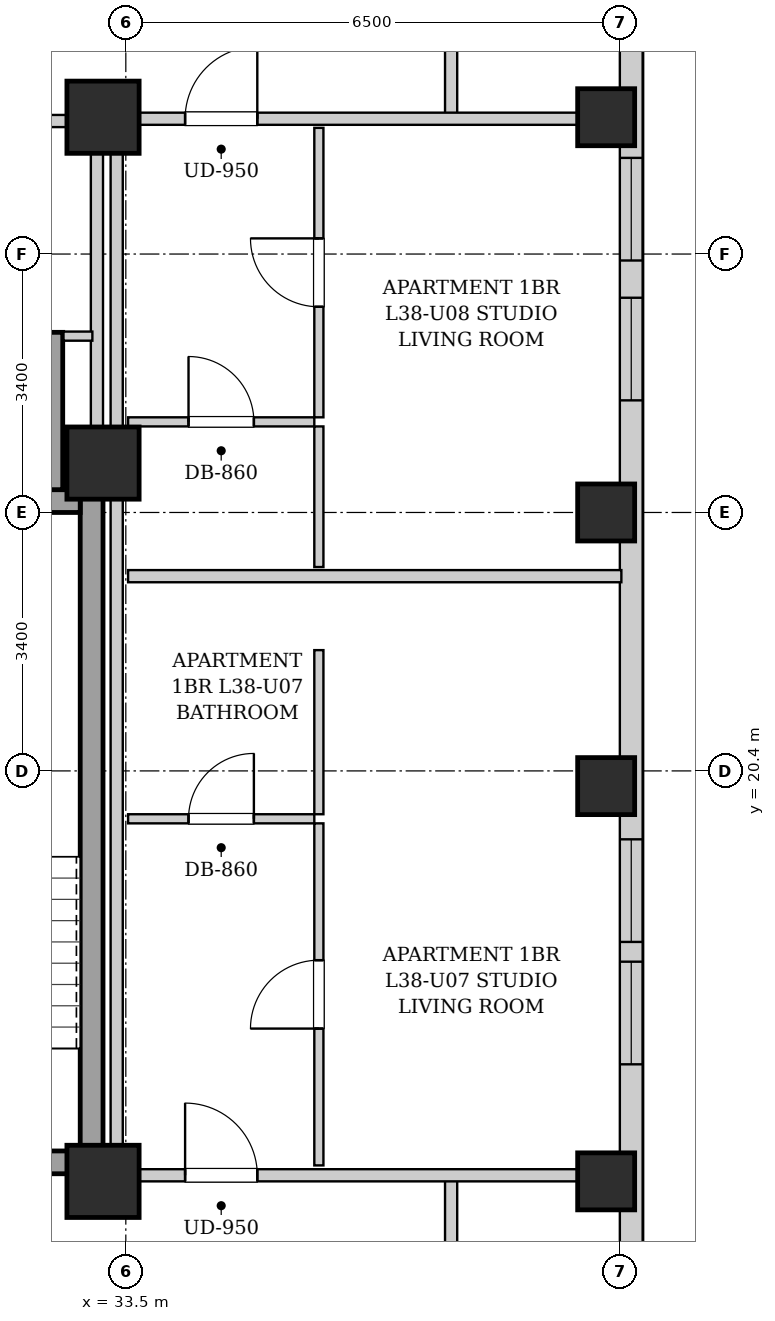
"""IFC4 building model, lengths in metres.
Left out: names, types, materials, properties, quantities, classifications, styles, units other than length and angle.
Written with IfcOpenShell. Run it as: python <this file> out.ifc"""

import sys

from ifc_helpers import new_model, si_unit, direction, frame, frame_2d, origin, origin_2d, place, context, subcontext, project, spatial, rectangle, extrude, element, fill, save


model = new_model("IFC4")
c1 = context("Model", 3, precision=1e-05, world=origin(), true_north=direction((0.0, 1.0)))
c2 = subcontext(c1, "Body", "Model", "MODEL_VIEW")
j1 = project(units=[si_unit("LENGTHUNIT", "METRE"), si_unit("PLANEANGLEUNIT", "RADIAN")], contexts=[c1])
p1 = place(None, origin())
s1 = spatial("IfcSite", under=j1, at=p1, CompositionType="ELEMENT")
p2 = place(p1, origin())
s2 = spatial("IfcBuilding", under=s1, at=p2, CompositionType="ELEMENT")
p3 = place(p2, frame((0.0, 0.0, 134.15)))
s3 = spatial("IfcBuildingStorey", under=s2, at=p3, CompositionType="ELEMENT", Elevation=134.15)
for number, where, z_axis, x_axis in (
    (1, (39.82, 15.0, 0.0), (0.0, 0.0, 1.0), (1.0, 0.0, 0.0)),
    (2, (39.82, 20.2, 0.0), (0.0, 0.0, 1.0), (1.0, 0.0, 0.0)),
    (3, (39.82, 23.8, 0.0), (0.0, 0.0, 1.0), (1.0, 0.0, 0.0)),
    (4, (39.82, 29.0, 0.0), (0.0, 0.0, 1.0), (1.0, 0.0, 0.0)),
):
    element("IfcColumn", number, at=place(p3, frame(where, z_axis=z_axis, x_axis=x_axis)), inside=s3, PredefinedType="COLUMN", context=c2, shape_type="SweptSolid", body=[
        extrude(rectangle(XDim=0.75, YDim=0.75, at=origin_2d()), origin(), (0.0, 0.0, 1.0), 3.25),
    ])
for number, where, z_axis, x_axis in (
    (5, (33.2, 15.0, 0.0), (0.0, 0.0, 1.0), (1.0, 0.0, 0.0)),
    (6, (33.2, 29.0, 0.0), (0.0, 0.0, 1.0), (1.0, 0.0, 0.0)),
    (7, (33.2, 24.45, 0.0), (0.0, 0.0, 1.0), (1.0, 0.0, 0.0)),
):
    element("IfcColumn", number, at=place(p3, frame(where, z_axis=z_axis, x_axis=x_axis)), inside=s3, PredefinedType="COLUMN", context=c2, shape_type="SweptSolid", body=[
        extrude(rectangle(XDim=0.95, YDim=0.95, at=origin_2d()), origin(), (0.0, 0.0, 1.0), 3.25),
    ])
p4 = place(p3, frame((40.15, 40.8, 0.0), z_axis=(0.0, 0.0, 1.0), x_axis=(0.0, -1.0, 0.0)))
e8 = element("IfcWall", 8, at=p4, inside=s3, PredefinedType="SOLIDWALL", context=c2, shape_type="SweptSolid", body=[
    extrude(rectangle(XDim=34.5, YDim=0.3, at=frame_2d((17.25, 0.0))), origin(), (0.0, 0.0, 1.0), 2.99),
])
p5 = place(p4, frame((31.725, 0.0, 0.55)))
e9 = element("IfcOpeningElement", 9, at=p5, cuts=e8, PredefinedType="OPENING", context=c2, shape_type="SweptSolid", body=[
    extrude(rectangle(XDim=1.35, YDim=1.2, at=frame_2d((0.675, 0.6))), frame((0.0, 0.16, 0.0), z_axis=(0.0, -1.0, 0.0), x_axis=(1.0, 0.0, 0.0)), (0.0, 0.0, 1.0), 0.32),
])
p6 = place(p4, frame((3.0, 0.0, 0.55)))
e10 = element("IfcOpeningElement", 10, at=p6, cuts=e8, PredefinedType="OPENING", context=c2, shape_type="SweptSolid", body=[
    extrude(rectangle(XDim=1.35, YDim=1.2, at=frame_2d((0.675, 0.6))), frame((0.0, 0.16, 0.0), z_axis=(0.0, -1.0, 0.0), x_axis=(1.0, 0.0, 0.0)), (0.0, 0.0, 1.0), 0.32),
])
p7 = place(p4, frame((1.085, 0.0, 0.55)))
e11 = element("IfcOpeningElement", 11, at=p7, cuts=e8, PredefinedType="OPENING", context=c2, shape_type="SweptSolid", body=[
    extrude(rectangle(XDim=1.35, YDim=1.2, at=frame_2d((0.675, 0.6))), frame((0.0, 0.16, 0.0), z_axis=(0.0, -1.0, 0.0), x_axis=(1.0, 0.0, 0.0)), (0.0, 0.0, 1.0), 0.32),
])
p8 = place(p4, frame((21.3, 0.0, 0.55)))
e12 = element("IfcOpeningElement", 12, at=p8, cuts=e8, PredefinedType="OPENING", context=c2, shape_type="SweptSolid", body=[
    extrude(rectangle(XDim=1.35, YDim=1.2, at=frame_2d((0.675, 0.6))), frame((0.0, 0.16, 0.0), z_axis=(0.0, -1.0, 0.0), x_axis=(1.0, 0.0, 0.0)), (0.0, 0.0, 1.0), 0.32),
])
p9 = place(p4, frame((22.91, 0.0, 0.55)))
e13 = element("IfcOpeningElement", 13, at=p9, cuts=e8, PredefinedType="OPENING", context=c2, shape_type="SweptSolid", body=[
    extrude(rectangle(XDim=1.35, YDim=1.2, at=frame_2d((0.675, 0.6))), frame((0.0, 0.16, 0.0), z_axis=(0.0, -1.0, 0.0), x_axis=(1.0, 0.0, 0.0)), (0.0, 0.0, 1.0), 0.32),
])
p10 = place(p4, frame((14.175, 0.0, 0.55)))
e14 = element("IfcOpeningElement", 14, at=p10, cuts=e8, PredefinedType="OPENING", context=c2, shape_type="SweptSolid", body=[
    extrude(rectangle(XDim=1.35, YDim=1.2, at=frame_2d((0.675, 0.6))), frame((0.0, 0.16, 0.0), z_axis=(0.0, -1.0, 0.0), x_axis=(1.0, 0.0, 0.0)), (0.0, 0.0, 1.0), 0.32),
])
p11 = place(p4, frame((12.335, 0.0, 0.55)))
e15 = element("IfcOpeningElement", 15, at=p11, cuts=e8, PredefinedType="OPENING", context=c2, shape_type="SweptSolid", body=[
    extrude(rectangle(XDim=1.35, YDim=1.2, at=frame_2d((0.675, 0.6))), frame((0.0, 0.16, 0.0), z_axis=(0.0, -1.0, 0.0), x_axis=(1.0, 0.0, 0.0)), (0.0, 0.0, 1.0), 0.32),
])
p12 = place(p3, frame((33.05, 15.1, 0.0), z_axis=(0.0, 0.0, 1.0), x_axis=(0.0, 1.0, 0.0)))
e16 = element("IfcWall", 16, at=p12, inside=s3, PredefinedType="SHEAR", context=c2, shape_type="SweptSolid", body=[
    extrude(rectangle(XDim=9.0, YDim=0.3, at=frame_2d((4.5, 0.0))), origin(), (0.0, 0.0, 1.0), 2.99),
])
p13 = place(p3, frame((30.05, 23.95, 0.0), z_axis=(0.0, 0.0, 1.0), x_axis=(1.0, 0.0, 0.0)))
e17 = element("IfcWall", 17, at=p13, inside=s3, PredefinedType="SHEAR", context=c2, shape_type="SweptSolid", body=[
    extrude(rectangle(XDim=2.85, YDim=0.3, at=frame_2d((1.425, 0.0))), origin(), (0.0, 0.0, 1.0), 2.99),
])
p14 = place(p3, frame((30.05, 15.25, 0.0), z_axis=(0.0, 0.0, 1.0), x_axis=(1.0, 0.0, 0.0)))
e18 = element("IfcWall", 18, at=p14, inside=s3, PredefinedType="SHEAR", context=c2, shape_type="SweptSolid", body=[
    extrude(rectangle(XDim=2.85, YDim=0.3, at=frame_2d((1.425, 0.0))), origin(), (0.0, 0.0, 1.0), 2.99),
])
p15 = place(p14, frame((0.86, 0.0, 0.0)))
e19 = element("IfcOpeningElement", 19, at=p15, cuts=e18, PredefinedType="OPENING", context=c2, shape_type="SweptSolid", body=[
    extrude(rectangle(XDim=1.1, YDim=2.05, at=frame_2d((0.55, 1.025))), frame((0.0, 0.16, 0.0), z_axis=(0.0, -1.0, 0.0), x_axis=(1.0, 0.0, 0.0)), (0.0, 0.0, 1.0), 0.32),
])
p16 = place(p3, frame((32.56, 24.1, 0.0), z_axis=(0.0, 0.0, 1.0), x_axis=(0.0, 1.0, 0.0)))
e20 = element("IfcWall", 20, at=p16, inside=s3, PredefinedType="SHEAR", context=c2, shape_type="SweptSolid", body=[
    extrude(rectangle(XDim=2.07, YDim=0.22, at=frame_2d((1.035, 0.0))), origin(), (0.0, 0.0, 1.0), 2.99),
])
p17 = place(p3, frame((33.12, 24.12, 0.0), z_axis=(0.0, 0.0, 1.0), x_axis=(0.0, 1.0, 0.0)))
e21 = element("IfcWall", 21, at=p17, inside=s3, PredefinedType="PARTITIONING", context=c2, shape_type="SweptSolid", body=[
    extrude(rectangle(XDim=4.76, YDim=0.16, at=frame_2d((2.38, 0.0))), origin(), (0.0, 0.0, 1.0), 2.99),
])
p18 = place(p3, frame((32.68, 26.12, 0.0), z_axis=(0.0, 0.0, 1.0), x_axis=(1.0, 0.0, 0.0)))
e22 = element("IfcWall", 22, at=p18, inside=s3, PredefinedType="PARTITIONING", context=c2, shape_type="SweptSolid", body=[
    extrude(rectangle(XDim=0.38, YDim=0.12, at=frame_2d((0.19, 0.0))), origin(), (0.0, 0.0, 1.0), 2.99),
])
p19 = place(p3, frame((30.08, 28.95, 0.0), z_axis=(0.0, 0.0, 1.0), x_axis=(1.0, 0.0, 0.0)))
e23 = element("IfcWall", 23, at=p19, inside=s3, PredefinedType="PARTITIONING", context=c2, shape_type="SweptSolid", body=[
    extrude(rectangle(XDim=2.96, YDim=0.16, at=frame_2d((1.48, 0.0))), origin(), (0.0, 0.0, 1.0), 2.99),
])
p20 = place(p19, frame((0.695, 0.0, 0.0)))
e24 = element("IfcOpeningElement", 24, at=p20, cuts=e23, PredefinedType="OPENING", context=c2, shape_type="SweptSolid", body=[
    extrude(rectangle(XDim=0.86, YDim=2.05, at=frame_2d((0.43, 1.025))), frame((0.0, 0.09, 0.0), z_axis=(0.0, -1.0, 0.0), x_axis=(1.0, 0.0, 0.0)), (0.0, 0.0, 1.0), 0.18),
])
for number, where, z_axis, x_axis in (
    (25, (37.78, 13.35, 0.0), (0.0, 0.0, 1.0), (0.0, 1.0, 0.0)),
    (26, (37.78, 28.98, 0.0), (0.0, 0.0, 1.0), (0.0, 1.0, 0.0)),
):
    element("IfcWall", number, at=place(p3, frame(where, z_axis=z_axis, x_axis=x_axis)), inside=s3, PredefinedType="PARTITIONING", context=c2, shape_type="SweptSolid", body=[
        extrude(rectangle(XDim=1.74, YDim=0.16, at=frame_2d((0.87, 0.0))), origin(), (0.0, 0.0, 1.0), 2.99),
    ])
p21 = place(p3, frame((33.38, 15.08, 0.0), z_axis=(0.0, 0.0, 1.0), x_axis=(1.0, 0.0, 0.0)))
e27 = element("IfcWall", 27, at=p21, inside=s3, PredefinedType="PARTITIONING", context=c2, shape_type="SweptSolid", body=[
    extrude(rectangle(XDim=6.64, YDim=0.16, at=frame_2d((3.32, 0.0))), origin(), (0.0, 0.0, 1.0), 2.426),
])
p22 = place(p21, frame((0.9, 0.0, 0.0)))
e28 = element("IfcOpeningElement", 28, at=p22, cuts=e27, PredefinedType="OPENING", context=c2, shape_type="SweptSolid", body=[
    extrude(rectangle(XDim=0.95, YDim=2.1, at=frame_2d((0.475, 1.05))), frame((0.0, 0.09, 0.0), z_axis=(0.0, -1.0, 0.0), x_axis=(1.0, 0.0, 0.0)), (0.0, 0.0, 1.0), 0.18),
])
p23 = place(p3, frame((33.53, 22.962, 0.0), z_axis=(0.0, 0.0, 1.0), x_axis=(1.0, 0.0, 0.0)))
e29 = element("IfcWall", 29, at=p23, inside=s3, PredefinedType="PARTITIONING", context=c2, shape_type="SweptSolid", body=[
    extrude(rectangle(XDim=6.49, YDim=0.16, at=frame_2d((3.245, 0.0))), origin(), (0.0, 0.0, 1.0), 2.99),
])
p24 = place(p3, frame((33.53, 19.77, 0.0), z_axis=(0.0, 0.0, 1.0), x_axis=(1.0, 0.0, 0.0)))
e30 = element("IfcWall", 30, at=p24, inside=s3, PredefinedType="PARTITIONING", context=c2, shape_type="SweptSolid", body=[
    extrude(rectangle(XDim=2.45, YDim=0.12, at=frame_2d((1.225, 0.0))), origin(), (0.0, 0.0, 1.0), 2.99),
])
p25 = place(p24, frame((0.795, 0.0, 0.0)))
e31 = element("IfcOpeningElement", 31, at=p25, cuts=e30, PredefinedType="OPENING", context=c2, shape_type="SweptSolid", body=[
    extrude(rectangle(XDim=0.86, YDim=2.05, at=frame_2d((0.43, 1.025))), frame((0.0, 0.07, 0.0), z_axis=(0.0, -1.0, 0.0), x_axis=(1.0, 0.0, 0.0)), (0.0, 0.0, 1.0), 0.14),
])
p26 = place(p3, frame((36.04, 19.83, 0.0), z_axis=(0.0, 0.0, 1.0), x_axis=(0.0, 1.0, 0.0)))
e32 = element("IfcWall", 32, at=p26, inside=s3, PredefinedType="PARTITIONING", context=c2, shape_type="SweptSolid", body=[
    extrude(rectangle(XDim=2.159, YDim=0.12, at=frame_2d((1.08, 0.0))), origin(), (0.0, 0.0, 1.0), 2.99),
])
p27 = place(p3, frame((36.04, 15.21, 0.0), z_axis=(0.0, 0.0, 1.0), x_axis=(0.0, 1.0, 0.0)))
e33 = element("IfcWall", 33, at=p27, inside=s3, PredefinedType="PARTITIONING", context=c2, shape_type="SweptSolid", body=[
    extrude(rectangle(XDim=4.5, YDim=0.12, at=frame_2d((2.25, 0.0))), origin(), (0.0, 0.0, 1.0), 2.99),
])
p28 = place(p27, frame((1.8, 0.0, 0.0)))
e34 = element("IfcOpeningElement", 34, at=p28, cuts=e33, PredefinedType="OPENING", context=c2, shape_type="SweptSolid", body=[
    extrude(rectangle(XDim=0.9, YDim=2.05, at=frame_2d((0.45, 1.025))), frame((0.0, 0.07, 0.0), z_axis=(0.0, -1.0, 0.0), x_axis=(1.0, 0.0, 0.0)), (0.0, 0.0, 1.0), 0.14),
])
p29 = place(p3, frame((33.38, 28.98, 0.0), z_axis=(0.0, 0.0, 1.0), x_axis=(1.0, 0.0, 0.0)))
e35 = element("IfcWall", 35, at=p29, inside=s3, PredefinedType="PARTITIONING", context=c2, shape_type="SweptSolid", body=[
    extrude(rectangle(XDim=6.64, YDim=0.16, at=frame_2d((3.32, 0.0))), origin(), (0.0, 0.0, 1.0), 2.426),
])
p30 = place(p29, frame((0.9, 0.0, 0.0)))
e36 = element("IfcOpeningElement", 36, at=p30, cuts=e35, PredefinedType="OPENING", context=c2, shape_type="SweptSolid", body=[
    extrude(rectangle(XDim=0.95, YDim=2.1, at=frame_2d((0.475, 1.05))), frame((0.0, 0.09, 0.0), z_axis=(0.0, -1.0, 0.0), x_axis=(1.0, 0.0, 0.0)), (0.0, 0.0, 1.0), 0.18),
])
p31 = place(p3, frame((33.53, 24.992, 0.0), z_axis=(0.0, 0.0, 1.0), x_axis=(1.0, 0.0, 0.0)))
e37 = element("IfcWall", 37, at=p31, inside=s3, PredefinedType="PARTITIONING", context=c2, shape_type="SweptSolid", body=[
    extrude(rectangle(XDim=2.45, YDim=0.12, at=frame_2d((1.225, 0.0))), origin(), (0.0, 0.0, 1.0), 2.99),
])
p32 = place(p31, frame((0.795, 0.0, 0.0)))
e38 = element("IfcOpeningElement", 38, at=p32, cuts=e37, PredefinedType="OPENING", context=c2, shape_type="SweptSolid", body=[
    extrude(rectangle(XDim=0.86, YDim=2.05, at=frame_2d((0.43, 1.025))), frame((0.0, 0.07, 0.0), z_axis=(0.0, -1.0, 0.0), x_axis=(1.0, 0.0, 0.0)), (0.0, 0.0, 1.0), 0.14),
])
p33 = place(p3, frame((36.04, 23.082, 0.0), z_axis=(0.0, 0.0, 1.0), x_axis=(0.0, 1.0, 0.0)))
e39 = element("IfcWall", 39, at=p33, inside=s3, PredefinedType="PARTITIONING", context=c2, shape_type="SweptSolid", body=[
    extrude(rectangle(XDim=1.85, YDim=0.12, at=frame_2d((0.925, 0.0))), origin(), (0.0, 0.0, 1.0), 2.99),
])
p34 = place(p3, frame((36.04, 25.052, 0.0), z_axis=(0.0, 0.0, 1.0), x_axis=(0.0, 1.0, 0.0)))
e40 = element("IfcWall", 40, at=p34, inside=s3, PredefinedType="PARTITIONING", context=c2, shape_type="SweptSolid", body=[
    extrude(rectangle(XDim=3.808, YDim=0.12, at=frame_2d((1.904, 0.0))), origin(), (0.0, 0.0, 1.0), 2.99),
])
p35 = place(p34, frame((1.454, 0.0, 0.0)))
e41 = element("IfcOpeningElement", 41, at=p35, cuts=e40, PredefinedType="OPENING", context=c2, shape_type="SweptSolid", body=[
    extrude(rectangle(XDim=0.9, YDim=2.05, at=frame_2d((0.45, 1.025))), frame((0.0, 0.07, 0.0), z_axis=(0.0, -1.0, 0.0), x_axis=(1.0, 0.0, 0.0)), (0.0, 0.0, 1.0), 0.14),
])
p36 = place(p3, frame((33.38, 15.02, 0.0), z_axis=(0.0, 0.0, 1.0), x_axis=(0.0, 1.0, 0.0)))
e42 = element("IfcWall", 42, at=p36, inside=s3, PredefinedType="PARTITIONING", context=c2, shape_type="SweptSolid", body=[
    extrude(rectangle(XDim=13.98, YDim=0.16, at=frame_2d((6.99, 0.0))), origin(), (0.0, 0.0, 1.0), 2.99),
])
p37 = place(p22, origin())
e43 = element("IfcDoor", 43, at=p37, inside=s3, OperationType="SINGLE_SWING_LEFT", PredefinedType="DOOR", context=c2, shape_type="SweptSolid", body=[
    extrude(rectangle(XDim=0.95, YDim=2.1, at=frame_2d((0.475, 1.05))), frame((0.0, 0.025, 0.0), z_axis=(0.0, -1.0, 0.0), x_axis=(1.0, 0.0, 0.0)), (0.0, 0.0, 1.0), 0.05),
])
fill(e28, e43)
p38 = place(p25, origin())
e44 = element("IfcDoor", 44, at=p38, inside=s3, OperationType="SINGLE_SWING_RIGHT", PredefinedType="DOOR", context=c2, shape_type="SweptSolid", body=[
    extrude(rectangle(XDim=0.86, YDim=2.05, at=frame_2d((0.43, 1.025))), frame((0.0, 0.025, 0.0), z_axis=(0.0, -1.0, 0.0), x_axis=(1.0, 0.0, 0.0)), (0.0, 0.0, 1.0), 0.05),
])
fill(e31, e44)
p39 = place(p28, origin())
e45 = element("IfcDoor", 45, at=p39, inside=s3, OperationType="SINGLE_SWING_LEFT", PredefinedType="DOOR", context=c2, shape_type="SweptSolid", body=[
    extrude(rectangle(XDim=0.9, YDim=2.05, at=frame_2d((0.45, 1.025))), frame((0.0, 0.025, 0.0), z_axis=(0.0, -1.0, 0.0), x_axis=(1.0, 0.0, 0.0)), (0.0, 0.0, 1.0), 0.05),
])
fill(e34, e45)
p40 = place(p30, origin())
e46 = element("IfcDoor", 46, at=p40, inside=s3, OperationType="SINGLE_SWING_RIGHT", PredefinedType="DOOR", context=c2, shape_type="SweptSolid", body=[
    extrude(rectangle(XDim=0.95, YDim=2.1, at=frame_2d((0.475, 1.05))), frame((0.0, 0.025, 0.0), z_axis=(0.0, -1.0, 0.0), x_axis=(1.0, 0.0, 0.0)), (0.0, 0.0, 1.0), 0.05),
])
fill(e36, e46)
p41 = place(p32, origin())
e47 = element("IfcDoor", 47, at=p41, inside=s3, OperationType="SINGLE_SWING_LEFT", PredefinedType="DOOR", context=c2, shape_type="SweptSolid", body=[
    extrude(rectangle(XDim=0.86, YDim=2.05, at=frame_2d((0.43, 1.025))), frame((0.0, 0.025, 0.0), z_axis=(0.0, -1.0, 0.0), x_axis=(1.0, 0.0, 0.0)), (0.0, 0.0, 1.0), 0.05),
])
fill(e38, e47)
p42 = place(p35, origin())
e48 = element("IfcDoor", 48, at=p42, inside=s3, OperationType="SINGLE_SWING_RIGHT", PredefinedType="DOOR", context=c2, shape_type="SweptSolid", body=[
    extrude(rectangle(XDim=0.9, YDim=2.05, at=frame_2d((0.45, 1.025))), frame((0.0, 0.025, 0.0), z_axis=(0.0, -1.0, 0.0), x_axis=(1.0, 0.0, 0.0)), (0.0, 0.0, 1.0), 0.05),
])
fill(e41, e48)
p43 = place(p8, origin())
e49 = element("IfcWindow", 49, at=p43, inside=s3, PartitioningType="SINGLE_PANEL", PredefinedType="WINDOW", context=c2, shape_type="SweptSolid", body=[
    extrude(rectangle(XDim=1.35, YDim=1.2, at=frame_2d((0.675, 0.6))), frame((0.0, 0.03, 0.0), z_axis=(0.0, -1.0, 0.0), x_axis=(1.0, 0.0, 0.0)), (0.0, 0.0, 1.0), 0.06),
])
fill(e12, e49)
p44 = place(p9, origin())
e50 = element("IfcWindow", 50, at=p44, inside=s3, PartitioningType="SINGLE_PANEL", PredefinedType="WINDOW", context=c2, shape_type="SweptSolid", body=[
    extrude(rectangle(XDim=1.35, YDim=1.2, at=frame_2d((0.675, 0.6))), frame((0.0, 0.03, 0.0), z_axis=(0.0, -1.0, 0.0), x_axis=(1.0, 0.0, 0.0)), (0.0, 0.0, 1.0), 0.06),
])
fill(e13, e50)
p45 = place(p10, origin())
e51 = element("IfcWindow", 51, at=p45, inside=s3, PartitioningType="SINGLE_PANEL", PredefinedType="WINDOW", context=c2, shape_type="SweptSolid", body=[
    extrude(rectangle(XDim=1.35, YDim=1.2, at=frame_2d((0.675, 0.6))), frame((0.0, 0.03, 0.0), z_axis=(0.0, -1.0, 0.0), x_axis=(1.0, 0.0, 0.0)), (0.0, 0.0, 1.0), 0.06),
])
fill(e14, e51)
p46 = place(p11, origin())
e52 = element("IfcWindow", 52, at=p46, inside=s3, PartitioningType="SINGLE_PANEL", PredefinedType="WINDOW", context=c2, shape_type="SweptSolid", body=[
    extrude(rectangle(XDim=1.35, YDim=1.2, at=frame_2d((0.675, 0.6))), frame((0.0, 0.03, 0.0), z_axis=(0.0, -1.0, 0.0), x_axis=(1.0, 0.0, 0.0)), (0.0, 0.0, 1.0), 0.06),
])
fill(e15, e52)
save(model, sys.argv[1])
